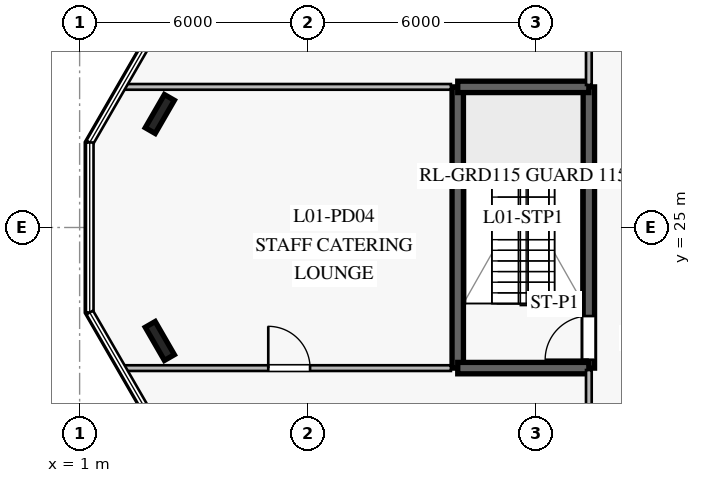
"""IFC4 building model, lengths in metres.
Left out: names, types, materials, properties, quantities, classifications, styles, units other than length and angle.
Written with IfcOpenShell. Run it as: python <this file> out.ifc"""

import sys

from ifc_helpers import new_model, si_unit, direction, frame, frame_2d, origin, origin_2d, place, context, subcontext, project, spatial, rectangle, i_section, extrude, element, fill, save


model = new_model("IFC4")
c1 = context("Model", 3, precision=1e-05, world=origin(), true_north=direction((0.0, 1.0)))
c2 = subcontext(c1, "Body", "Model", "MODEL_VIEW")
j1 = project(units=[si_unit("LENGTHUNIT", "METRE"), si_unit("PLANEANGLEUNIT", "RADIAN")], contexts=[c1])
p1 = place(None, origin())
s1 = spatial("IfcSite", under=j1, at=p1, CompositionType="ELEMENT")
p2 = place(p1, origin())
s2 = spatial("IfcBuilding", under=s1, at=p2, CompositionType="ELEMENT")
p3 = place(p2, frame((0.0, 0.0, 5.2)))
s3 = spatial("IfcBuildingStorey", under=s2, at=p3, CompositionType="ELEMENT", Elevation=5.2)
p4 = place(p3, frame((14.4, 21.3, 0.0), z_axis=(0.0, 0.0, 1.0), x_axis=(0.0, 1.0, 0.0)))
e1 = element("IfcWall", 1, at=p4, inside=s3, PredefinedType="SOLIDWALL", context=c2, shape_type="SweptSolid", body=[
    extrude(rectangle(XDim=7.4, YDim=0.3, at=frame_2d((3.7, 0.0))), origin(), (0.0, 0.0, 1.0), 4.34),
])
p5 = place(p4, frame((0.22, 0.0, 0.0)))
e2 = element("IfcOpeningElement", 2, at=p5, cuts=e1, PredefinedType="OPENING", context=c2, shape_type="SweptSolid", body=[
    extrude(rectangle(XDim=1.15, YDim=2.2, at=frame_2d((0.575, 1.1))), frame((0.0, 0.16, 0.0), z_axis=(0.0, -1.0, 0.0), x_axis=(1.0, 0.0, 0.0)), (0.0, 0.0, 1.0), 0.32),
])
p6 = place(p3, frame((10.95, 21.3, 0.0), z_axis=(0.0, 0.0, 1.0), x_axis=(0.0, 1.0, 0.0)))
e3 = element("IfcWall", 3, at=p6, inside=s3, PredefinedType="SOLIDWALL", context=c2, shape_type="SweptSolid", body=[
    extrude(rectangle(XDim=7.4, YDim=0.3, at=frame_2d((3.7, 0.0))), origin(), (0.0, 0.0, 1.0), 4.34),
])
for number, where, z_axis, x_axis in (
    (4, (10.95, 21.3, 0.0), (0.0, 0.0, 1.0), (1.0, 0.0, 0.0)),
    (5, (10.95, 28.7, 0.0), (0.0, 0.0, 1.0), (1.0, 0.0, 0.0)),
):
    element("IfcWall", number, at=place(p3, frame(where, z_axis=z_axis, x_axis=x_axis)), inside=s3, PredefinedType="SOLIDWALL", context=c2, shape_type="SweptSolid", body=[
        extrude(rectangle(XDim=3.45, YDim=0.3, at=frame_2d((1.725, 0.0))), origin(), (0.0, 0.0, 1.0), 4.34),
    ])
for number, where, z_axis, x_axis in (
    (6, (3.11, 27.986, 0.0), (0.0, 0.0, 1.0), (0.5, 0.866, 0.0)),
    (7, (3.11, 22.014, 0.0), (0.0, 0.0, 1.0), (-0.5, 0.866, 0.0)),
):
    element("IfcColumn", number, at=place(p3, frame(where, z_axis=z_axis, x_axis=x_axis)), inside=s3, PredefinedType="COLUMN", context=c2, shape_type="SweptSolid", body=[
        extrude(i_section(OverallWidth=0.302, OverallDepth=1.008, WebThickness=0.021, FlangeThickness=0.04, at=origin_2d()), origin(), (0.0, 0.0, 1.0), 4.6),
    ])
p7 = place(p3, frame((14.4, 15.0, 0.0), z_axis=(0.0, 0.0, 1.0), x_axis=(0.0, 1.0, 0.0)))
e8 = element("IfcWall", 8, at=p7, inside=s3, PredefinedType="PARTITIONING", context=c2, shape_type="SweptSolid", body=[
    extrude(rectangle(XDim=6.25, YDim=0.15, at=frame_2d((3.125, 0.0))), origin(), (0.0, 0.0, 1.0), 3.79),
])
p8 = place(p3, frame((14.4, 28.75, 0.0), z_axis=(0.0, 0.0, 1.0), x_axis=(0.0, 1.0, 0.0)))
e9 = element("IfcWall", 9, at=p8, inside=s3, PredefinedType="PARTITIONING", context=c2, shape_type="SweptSolid", body=[
    extrude(rectangle(XDim=6.25, YDim=0.15, at=frame_2d((3.125, 0.0))), origin(), (0.0, 0.0, 1.0), 4.34),
])
p9 = place(p3, frame((2.08, 21.3, 0.0), z_axis=(0.0, 0.0, 1.0), x_axis=(1.0, 0.0, 0.0)))
e10 = element("IfcWall", 10, at=p9, inside=s3, PredefinedType="PARTITIONING", context=c2, shape_type="SweptSolid", body=[
    extrude(rectangle(XDim=8.69, YDim=0.15, at=frame_2d((4.345, 0.0))), origin(), (0.0, 0.0, 1.0), 3.64),
])
p10 = place(p9, frame((3.884, 0.0, 0.0)))
e11 = element("IfcOpeningElement", 11, at=p10, cuts=e10, PredefinedType="OPENING", context=c2, shape_type="SweptSolid", body=[
    extrude(rectangle(XDim=1.1, YDim=2.2, at=frame_2d((0.55, 1.1))), frame((0.0, 0.085, 0.0), z_axis=(0.0, -1.0, 0.0), x_axis=(1.0, 0.0, 0.0)), (0.0, 0.0, 1.0), 0.17),
])
p11 = place(p3, frame((2.08, 28.7, 0.0), z_axis=(0.0, 0.0, 1.0), x_axis=(1.0, 0.0, 0.0)))
e12 = element("IfcWall", 12, at=p11, inside=s3, PredefinedType="PARTITIONING", context=c2, shape_type="SweptSolid", body=[
    extrude(rectangle(XDim=8.69, YDim=0.15, at=frame_2d((4.345, 0.0))), origin(), (0.0, 0.0, 1.0), 3.64),
])
p12 = place(p5, origin())
e13 = element("IfcDoor", 13, at=p12, inside=s3, OperationType="SINGLE_SWING_LEFT", PredefinedType="DOOR", context=c2, shape_type="SweptSolid", body=[
    extrude(rectangle(XDim=1.15, YDim=2.2, at=frame_2d((0.575, 1.1))), frame((0.0, 0.025, 0.0), z_axis=(0.0, -1.0, 0.0), x_axis=(1.0, 0.0, 0.0)), (0.0, 0.0, 1.0), 0.05),
])
fill(e2, e13)
p13 = place(p10, origin())
e14 = element("IfcDoor", 14, at=p13, inside=s3, OperationType="SINGLE_SWING_LEFT", PredefinedType="DOOR", context=c2, shape_type="SweptSolid", body=[
    extrude(rectangle(XDim=1.1, YDim=2.2, at=frame_2d((0.55, 1.1))), frame((0.0, 0.025, 0.0), z_axis=(0.0, -1.0, 0.0), x_axis=(1.0, 0.0, 0.0)), (0.0, 0.0, 1.0), 0.05),
])
fill(e11, e14)
save(model, sys.argv[1])
